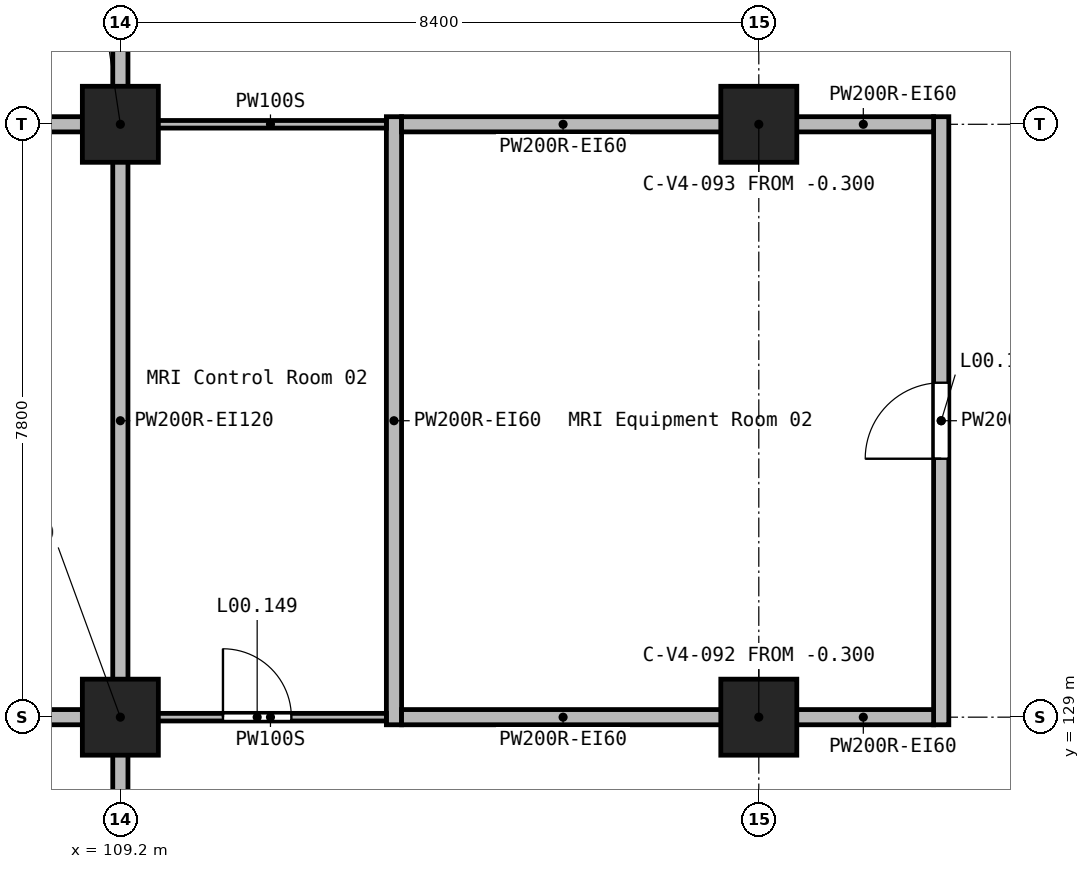
"""IFC4 building model, lengths in metres.
Left out: names, types, materials, properties, quantities, classifications, styles, units other than length and angle.
Written with IfcOpenShell. Run it as: python <this file> out.ifc"""

import sys

from ifc_helpers import new_model, si_unit, direction, frame, frame_2d, origin, origin_2d, place, context, subcontext, project, spatial, rectangle, extrude, element, fill, save


model = new_model("IFC4")
c1 = context("Model", 3, precision=1e-05, world=origin(), true_north=direction((0.0, 1.0)))
c2 = subcontext(c1, "Body", "Model", "MODEL_VIEW")
j1 = project(units=[si_unit("LENGTHUNIT", "METRE"), si_unit("PLANEANGLEUNIT", "RADIAN")], contexts=[c1])
p1 = place(None, origin())
s1 = spatial("IfcSite", under=j1, at=p1, CompositionType="ELEMENT")
p2 = place(p1, origin())
s2 = spatial("IfcBuilding", under=s1, at=p2, CompositionType="ELEMENT")
p3 = place(p2, origin())
s3 = spatial("IfcBuildingStorey", under=s2, at=p3, CompositionType="ELEMENT", Elevation=0.0)
for number, where, z_axis, x_axis in (
    (1, (109.2, 129.0, -0.3), (0.0, 0.0, 1.0), (1.0, 0.0, 0.0)),
    (2, (109.2, 136.8, -0.3), (0.0, 0.0, 1.0), (1.0, 0.0, 0.0)),
    (3, (117.6, 129.0, -0.3), (0.0, 0.0, 1.0), (1.0, 0.0, 0.0)),
    (4, (117.6, 136.8, -0.3), (0.0, 0.0, 1.0), (1.0, 0.0, 0.0)),
):
    element("IfcColumn", number, at=place(p3, frame(where, z_axis=z_axis, x_axis=x_axis)), inside=s3, PredefinedType="COLUMN", context=c2, shape_type="SweptSolid", body=[
        extrude(rectangle(XDim=1.0, YDim=1.0, at=origin_2d()), origin(), (0.0, 0.0, 1.0), 5.7),
    ])
p4 = place(p3, frame((109.2, 139.9, 0.0), z_axis=(0.0, 0.0, 1.0), x_axis=(0.0, -1.0, 0.0)))
e5 = element("IfcWall", 5, at=p4, inside=s3, PredefinedType="SOLIDWALL", context=c2, shape_type="SweptSolid", body=[
    extrude(rectangle(XDim=2.65, YDim=0.2, at=frame_2d((1.325, 0.0))), origin(), (0.0, 0.0, 1.0), 5.05),
])
p5 = place(p3, frame((109.2, 136.35, 0.0), z_axis=(0.0, 0.0, 1.0), x_axis=(0.0, -1.0, 0.0)))
e6 = element("IfcWall", 6, at=p5, inside=s3, PredefinedType="SOLIDWALL", context=c2, shape_type="SweptSolid", body=[
    extrude(rectangle(XDim=6.9, YDim=0.2, at=frame_2d((3.45, 0.0))), origin(), (0.0, 0.0, 1.0), 5.05),
])
p6 = place(p3, frame((109.2, 128.55, 0.0), z_axis=(0.0, 0.0, 1.0), x_axis=(0.0, -1.0, 0.0)))
e7 = element("IfcWall", 7, at=p6, inside=s3, PredefinedType="SOLIDWALL", context=c2, shape_type="SweptSolid", body=[
    extrude(rectangle(XDim=2.7, YDim=0.2, at=frame_2d((1.35, 0.0))), origin(), (0.0, 0.0, 1.0), 5.05),
])
p7 = place(p3, frame((112.8, 128.9, 0.0), z_axis=(0.0, 0.0, 1.0), x_axis=(0.0, 1.0, 0.0)))
e8 = element("IfcWall", 8, at=p7, inside=s3, PredefinedType="SOLIDWALL", context=c2, shape_type="SweptSolid", body=[
    extrude(rectangle(XDim=8.0, YDim=0.2, at=frame_2d((4.0, 0.0))), origin(), (0.0, 0.0, 1.0), 5.05),
])
p8 = place(p3, frame((120.0, 128.9, 0.0), z_axis=(0.0, 0.0, 1.0), x_axis=(0.0, 1.0, 0.0)))
e9 = element("IfcWall", 9, at=p8, inside=s3, PredefinedType="SOLIDWALL", context=c2, shape_type="SweptSolid", body=[
    extrude(rectangle(XDim=8.0, YDim=0.2, at=frame_2d((4.0, 0.0))), origin(), (0.0, 0.0, 1.0), 5.05),
])
p9 = place(p8, frame((3.5, 0.0, 0.0)))
e10 = element("IfcOpeningElement", 10, at=p9, cuts=e9, PredefinedType="OPENING", context=c2, shape_type="SweptSolid", body=[
    extrude(rectangle(XDim=1.0, YDim=2.1, at=frame_2d((0.5, 1.05))), frame((0.0, 0.11, 0.0), z_axis=(0.0, -1.0, 0.0), x_axis=(1.0, 0.0, 0.0)), (0.0, 0.0, 1.0), 0.22),
])
p10 = place(p3, frame((112.9, 129.0, 0.0), z_axis=(0.0, 0.0, 1.0), x_axis=(1.0, 0.0, 0.0)))
e11 = element("IfcWall", 11, at=p10, inside=s3, PredefinedType="SOLIDWALL", context=c2, shape_type="SweptSolid", body=[
    extrude(rectangle(XDim=4.25, YDim=0.2, at=frame_2d((2.125, 0.0))), origin(), (0.0, 0.0, 1.0), 5.05),
])
p11 = place(p3, frame((118.05, 129.0, 0.0), z_axis=(0.0, 0.0, 1.0), x_axis=(1.0, 0.0, 0.0)))
e12 = element("IfcWall", 12, at=p11, inside=s3, PredefinedType="SOLIDWALL", context=c2, shape_type="SweptSolid", body=[
    extrude(rectangle(XDim=1.85, YDim=0.2, at=frame_2d((0.925, 0.0))), origin(), (0.0, 0.0, 1.0), 5.05),
])
p12 = place(p3, frame((112.9, 136.8, 0.0), z_axis=(0.0, 0.0, 1.0), x_axis=(1.0, 0.0, 0.0)))
e13 = element("IfcWall", 13, at=p12, inside=s3, PredefinedType="SOLIDWALL", context=c2, shape_type="SweptSolid", body=[
    extrude(rectangle(XDim=4.25, YDim=0.2, at=frame_2d((2.125, 0.0))), origin(), (0.0, 0.0, 1.0), 5.05),
])
p13 = place(p3, frame((118.05, 136.8, 0.0), z_axis=(0.0, 0.0, 1.0), x_axis=(1.0, 0.0, 0.0)))
e14 = element("IfcWall", 14, at=p13, inside=s3, PredefinedType="SOLIDWALL", context=c2, shape_type="SweptSolid", body=[
    extrude(rectangle(XDim=1.85, YDim=0.2, at=frame_2d((0.925, 0.0))), origin(), (0.0, 0.0, 1.0), 5.05),
])
p14 = place(p3, frame((102.1, 129.0, 0.0), z_axis=(0.0, 0.0, 1.0), x_axis=(1.0, 0.0, 0.0)))
e15 = element("IfcWall", 15, at=p14, inside=s3, PredefinedType="SOLIDWALL", context=c2, shape_type="SweptSolid", body=[
    extrude(rectangle(XDim=6.65, YDim=0.2, at=frame_2d((3.325, 0.0))), origin(), (0.0, 0.0, 1.0), 5.05),
])
p15 = place(p14, frame((3.0, 0.0, 0.0)))
e16 = element("IfcOpeningElement", 16, at=p15, cuts=e15, PredefinedType="OPENING", context=c2, shape_type="SweptSolid", body=[
    extrude(rectangle(XDim=1.0, YDim=2.1, at=frame_2d((0.5, 1.05))), frame((0.0, 0.11, 0.0), z_axis=(0.0, -1.0, 0.0), x_axis=(1.0, 0.0, 0.0)), (0.0, 0.0, 1.0), 0.22),
])
p16 = place(p3, frame((102.1, 136.8, 0.0), z_axis=(0.0, 0.0, 1.0), x_axis=(1.0, 0.0, 0.0)))
e17 = element("IfcWall", 17, at=p16, inside=s3, PredefinedType="SOLIDWALL", context=c2, shape_type="SweptSolid", body=[
    extrude(rectangle(XDim=6.65, YDim=0.2, at=frame_2d((3.325, 0.0))), origin(), (0.0, 0.0, 1.0), 5.05),
])
p17 = place(p3, frame((109.65, 129.0, 0.0), z_axis=(0.0, 0.0, 1.0), x_axis=(1.0, 0.0, 0.0)))
e18 = element("IfcWall", 18, at=p17, inside=s3, PredefinedType="PARTITIONING", context=c2, shape_type="SweptSolid", body=[
    extrude(rectangle(XDim=3.05, YDim=0.1, at=frame_2d((1.525, 0.0))), origin(), (0.0, 0.0, 1.0), 5.05),
])
p18 = place(p17, frame((0.9, 0.0, 0.0)))
e19 = element("IfcOpeningElement", 19, at=p18, cuts=e18, PredefinedType="OPENING", context=c2, shape_type="SweptSolid", body=[
    extrude(rectangle(XDim=0.9, YDim=2.1, at=frame_2d((0.45, 1.05))), frame((0.0, 0.06, 0.0), z_axis=(0.0, -1.0, 0.0), x_axis=(1.0, 0.0, 0.0)), (0.0, 0.0, 1.0), 0.12),
])
p19 = place(p3, frame((109.65, 136.8, 0.0), z_axis=(0.0, 0.0, 1.0), x_axis=(1.0, 0.0, 0.0)))
e20 = element("IfcWall", 20, at=p19, inside=s3, PredefinedType="PARTITIONING", context=c2, shape_type="SweptSolid", body=[
    extrude(rectangle(XDim=3.05, YDim=0.1, at=frame_2d((1.525, 0.0))), origin(), (0.0, 0.0, 1.0), 5.05),
])
p20 = place(p18, origin())
e21 = element("IfcDoor", 21, at=p20, inside=s3, OperationType="SINGLE_SWING_LEFT", PredefinedType="DOOR", context=c2, shape_type="SweptSolid", body=[
    extrude(rectangle(XDim=0.9, YDim=2.1, at=frame_2d((0.45, 1.05))), frame((0.0, 0.025, 0.0), z_axis=(0.0, -1.0, 0.0), x_axis=(1.0, 0.0, 0.0)), (0.0, 0.0, 1.0), 0.05),
])
fill(e19, e21)
p21 = place(p9, origin())
e22 = element("IfcDoor", 22, at=p21, inside=s3, OperationType="SINGLE_SWING_LEFT", PredefinedType="DOOR", context=c2, shape_type="SweptSolid", body=[
    extrude(rectangle(XDim=1.0, YDim=2.1, at=frame_2d((0.5, 1.05))), frame((0.0, 0.025, 0.0), z_axis=(0.0, -1.0, 0.0), x_axis=(1.0, 0.0, 0.0)), (0.0, 0.0, 1.0), 0.05),
])
fill(e10, e22)
save(model, sys.argv[1])
